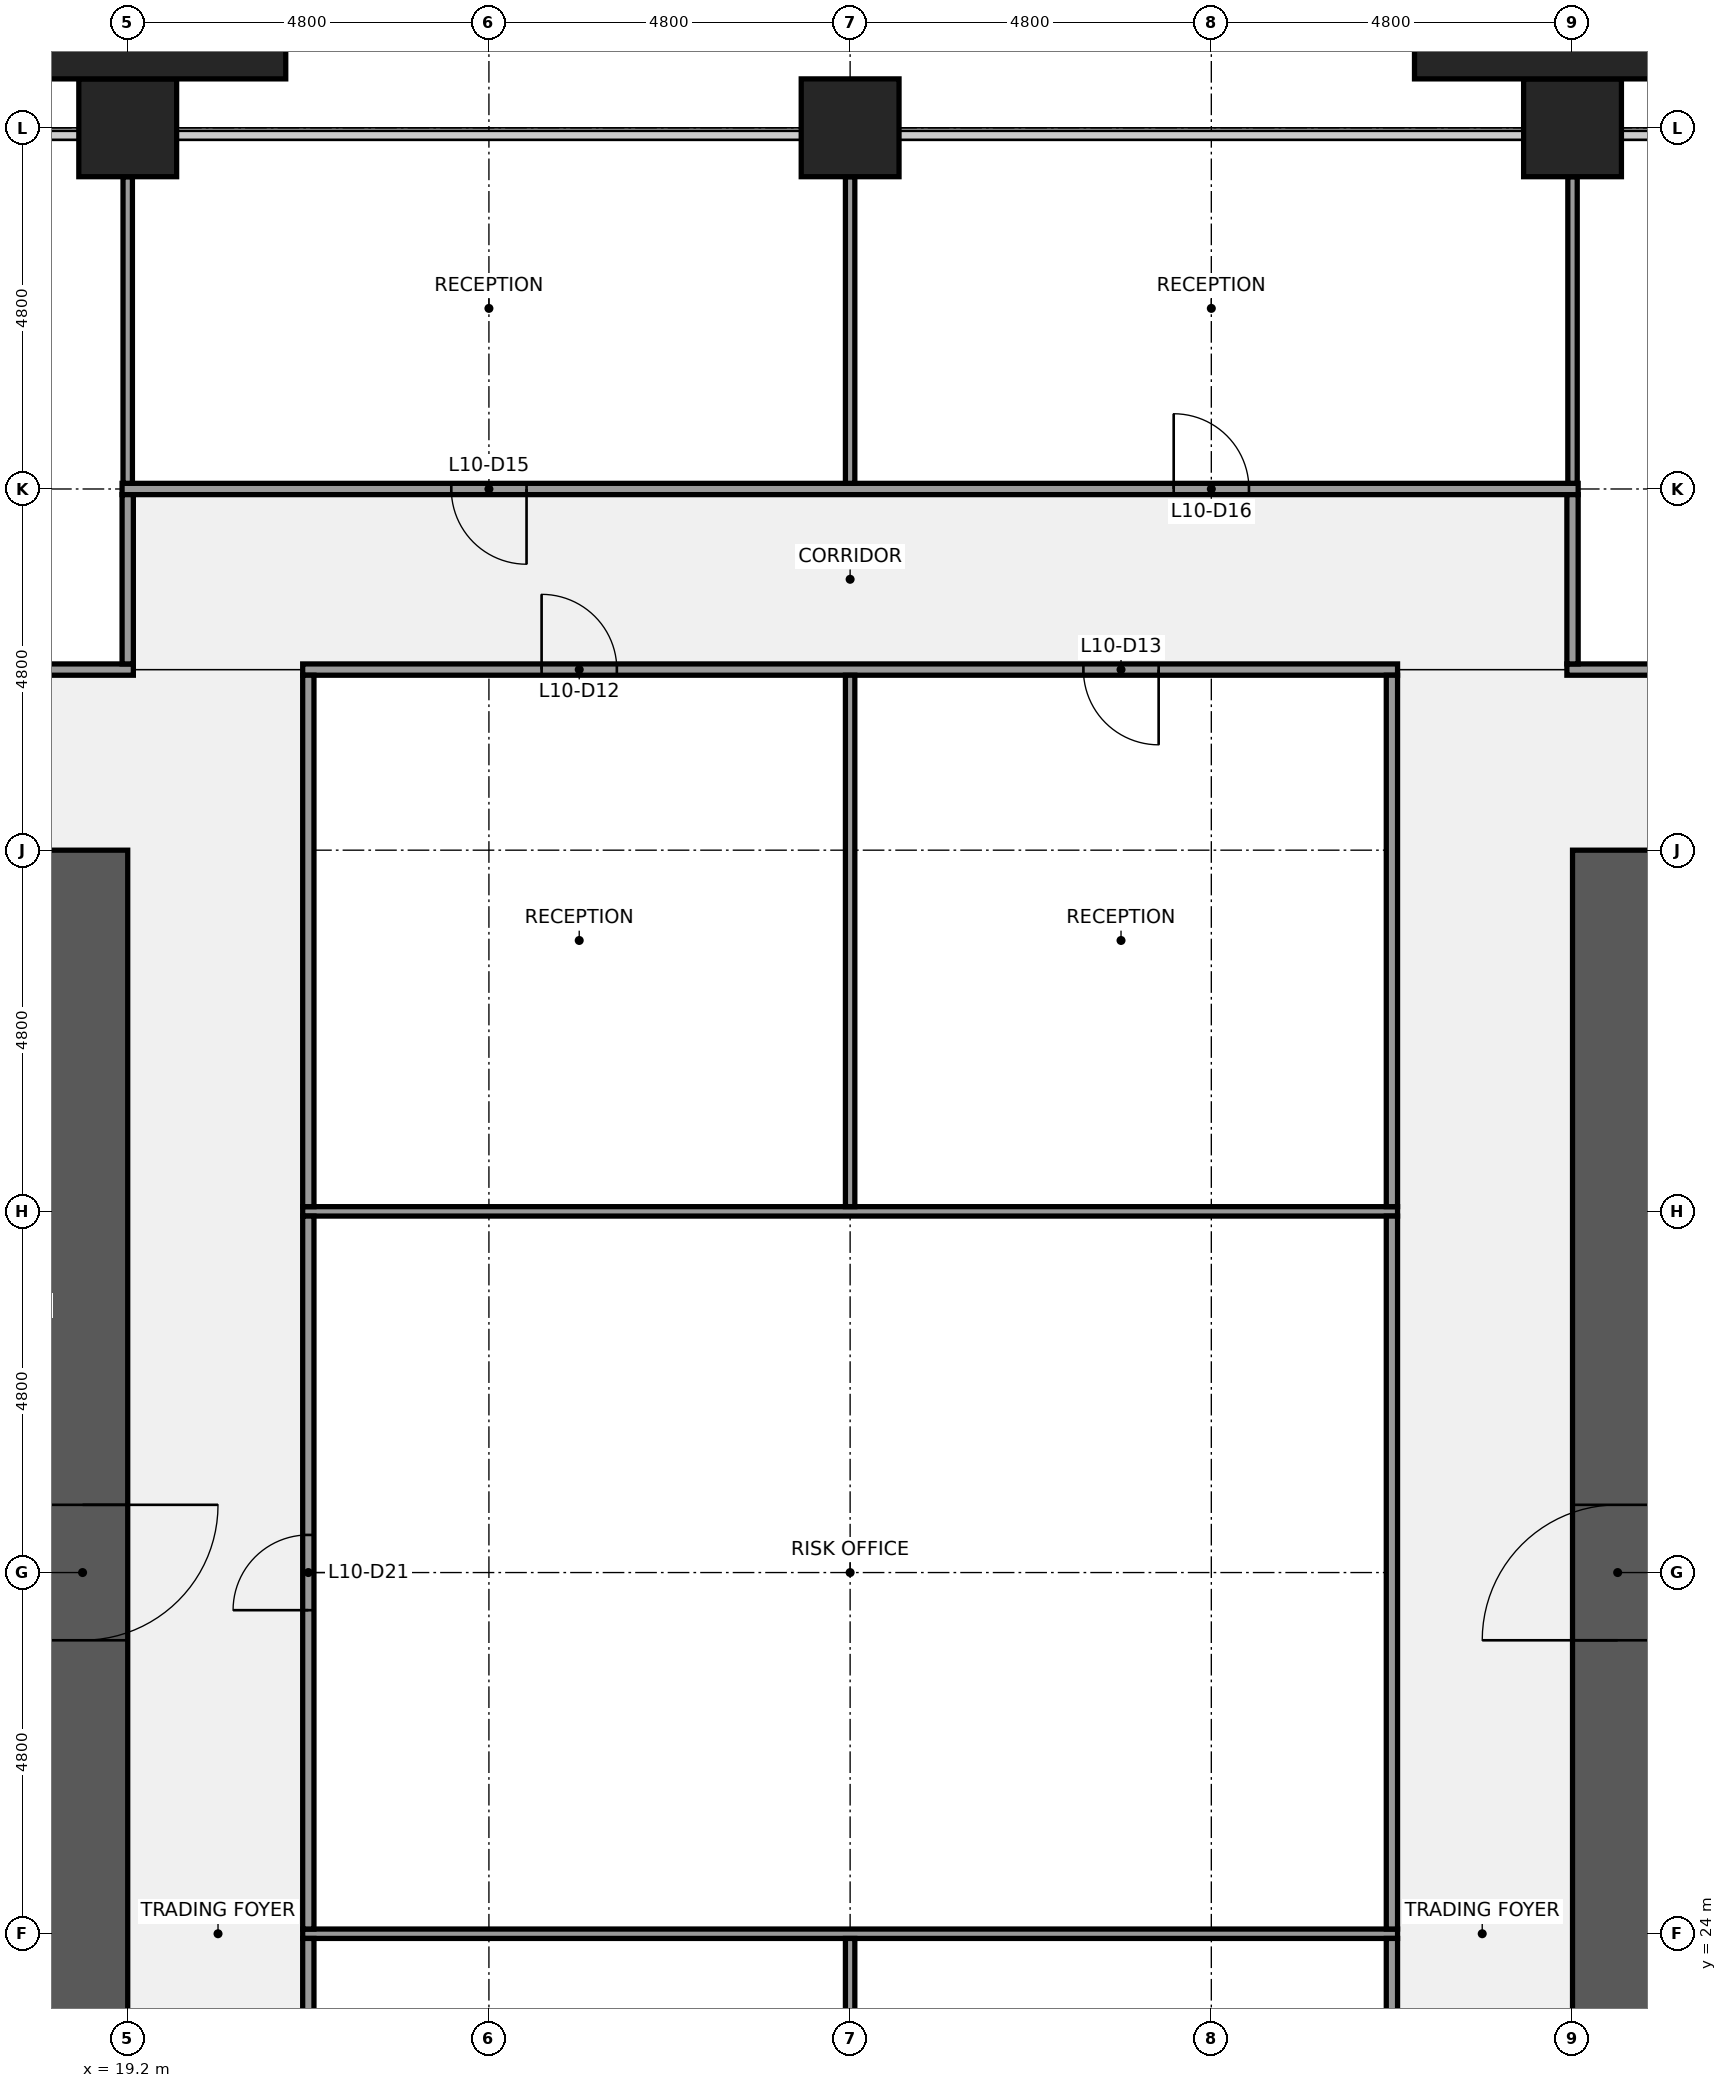
"""IFC4 building model, lengths in metres.
Left out: names, types, materials, properties, quantities, classifications, styles, units other than length and angle.
Written with IfcOpenShell. Run it as: python <this file> out.ifc"""

import sys

from ifc_helpers import new_model, si_unit, direction, frame, frame_2d, origin, origin_2d, place, context, subcontext, project, spatial, rectangle, extrude, element, fill, save


model = new_model("IFC4")
c1 = context("Model", 3, precision=1e-05, world=origin(), true_north=direction((0.0, 1.0)))
c2 = subcontext(c1, "Body", "Model", "MODEL_VIEW")
j1 = project(units=[si_unit("LENGTHUNIT", "METRE"), si_unit("PLANEANGLEUNIT", "RADIAN")], contexts=[c1])
p1 = place(None, origin())
s1 = spatial("IfcSite", under=j1, at=p1, CompositionType="ELEMENT")
p2 = place(p1, origin())
s2 = spatial("IfcBuilding", under=s1, at=p2, CompositionType="ELEMENT")
p3 = place(p2, frame((0.0, 0.0, 51.0)))
s3 = spatial("IfcBuildingStorey", under=s2, at=p3, CompositionType="ELEMENT", Elevation=51.0)
for number, where, z_axis, x_axis in (
    (1, (19.2, 48.0, 0.0), (0.0, 0.0, 1.0), (1.0, 0.0, 0.0)),
    (2, (28.8, 48.0, 0.0), (0.0, 0.0, 1.0), (1.0, 0.0, 0.0)),
    (3, (38.4, 48.0, 0.0), (0.0, 0.0, 1.0), (1.0, 0.0, 0.0)),
):
    element("IfcColumn", number, at=place(p3, frame(where, z_axis=z_axis, x_axis=x_axis)), inside=s3, PredefinedType="COLUMN", context=c2, shape_type="SweptSolid", body=[
        extrude(rectangle(XDim=1.3, YDim=1.3, at=origin_2d()), origin(), (0.0, 0.0, 1.0), 4.0),
    ])
p4 = place(p3, frame((18.6, 38.4, 0.0), z_axis=(0.0, 0.0, 1.0), x_axis=(0.0, -1.0, 0.0)))
e4 = element("IfcWall", 4, at=p4, inside=s3, PredefinedType="SHEAR", context=c2, shape_type="SweptSolid", body=[
    extrude(rectangle(XDim=28.8, YDim=1.2, at=frame_2d((14.4, 0.0))), origin(), (0.0, 0.0, 1.0), 3.84),
])
p5 = place(p4, frame((18.3, 0.0, 0.0)))
e5 = element("IfcOpeningElement", 5, at=p5, cuts=e4, PredefinedType="OPENING", context=c2, shape_type="SweptSolid", body=[
    extrude(rectangle(XDim=1.8, YDim=2.1, at=frame_2d((0.9, 1.05))), frame((0.0, 0.61, 0.0), z_axis=(0.0, -1.0, 0.0), x_axis=(1.0, 0.0, 0.0)), (0.0, 0.0, 1.0), 1.22),
])
p6 = place(p4, frame((8.7, 0.0, 0.0)))
e6 = element("IfcOpeningElement", 6, at=p6, cuts=e4, PredefinedType="OPENING", context=c2, shape_type="SweptSolid", body=[
    extrude(rectangle(XDim=1.8, YDim=2.1, at=frame_2d((0.9, 1.05))), frame((0.0, 0.61, 0.0), z_axis=(0.0, -1.0, 0.0), x_axis=(1.0, 0.0, 0.0)), (0.0, 0.0, 1.0), 1.22),
])
p7 = place(p3, frame((39.0, 9.6, 0.0), z_axis=(0.0, 0.0, 1.0), x_axis=(0.0, 1.0, 0.0)))
e7 = element("IfcWall", 7, at=p7, inside=s3, PredefinedType="SHEAR", context=c2, shape_type="SweptSolid", body=[
    extrude(rectangle(XDim=28.8, YDim=1.2, at=frame_2d((14.4, 0.0))), origin(), (0.0, 0.0, 1.0), 3.84),
])
p8 = place(p7, frame((8.7, 0.0, 0.0)))
e8 = element("IfcOpeningElement", 8, at=p8, cuts=e7, PredefinedType="OPENING", context=c2, shape_type="SweptSolid", body=[
    extrude(rectangle(XDim=1.8, YDim=2.1, at=frame_2d((0.9, 1.05))), frame((0.0, 0.61, 0.0), z_axis=(0.0, -1.0, 0.0), x_axis=(1.0, 0.0, 0.0)), (0.0, 0.0, 1.0), 1.22),
])
p9 = place(p7, frame((18.3, 0.0, 0.0)))
e9 = element("IfcOpeningElement", 9, at=p9, cuts=e7, PredefinedType="OPENING", context=c2, shape_type="SweptSolid", body=[
    extrude(rectangle(XDim=1.8, YDim=2.1, at=frame_2d((0.9, 1.05))), frame((0.0, 0.61, 0.0), z_axis=(0.0, -1.0, 0.0), x_axis=(1.0, 0.0, 0.0)), (0.0, 0.0, 1.0), 1.22),
])
for number, where, z_axis, x_axis in (
    (10, (21.525, 24.0, 0.0), (0.0, 0.0, 1.0), (1.0, 0.0, 0.0)),
    (11, (21.525, 33.6, 0.0), (0.0, 0.0, 1.0), (1.0, 0.0, 0.0)),
):
    element("IfcWall", number, at=place(p3, frame(where, z_axis=z_axis, x_axis=x_axis)), inside=s3, PredefinedType="PARTITIONING", context=c2, shape_type="SweptSolid", body=[
        extrude(rectangle(XDim=14.55, YDim=0.125, at=frame_2d((7.275, 0.0))), origin(), (0.0, 0.0, 1.0), 2.87),
    ])
p10 = place(p3, frame((9.525, 40.8, 0.0), z_axis=(0.0, 0.0, 1.0), x_axis=(1.0, 0.0, 0.0)))
e12 = element("IfcWall", 12, at=p10, inside=s3, PredefinedType="PARTITIONING", context=c2, shape_type="SweptSolid", body=[
    extrude(rectangle(XDim=9.75, YDim=0.15, at=frame_2d((4.875, 0.0))), origin(), (0.0, 0.0, 1.0), 2.87),
])
p11 = place(p10, frame((4.375, 0.0, 0.0)))
e13 = element("IfcOpeningElement", 13, at=p11, cuts=e12, PredefinedType="OPENING", context=c2, shape_type="SweptSolid", body=[
    extrude(rectangle(XDim=1.0, YDim=2.1, at=frame_2d((0.5, 1.05))), frame((0.0, 0.085, 0.0), z_axis=(0.0, -1.0, 0.0), x_axis=(1.0, 0.0, 0.0)), (0.0, 0.0, 1.0), 0.17),
])
p12 = place(p3, frame((21.525, 40.8, 0.0), z_axis=(0.0, 0.0, 1.0), x_axis=(1.0, 0.0, 0.0)))
e14 = element("IfcWall", 14, at=p12, inside=s3, PredefinedType="PARTITIONING", context=c2, shape_type="SweptSolid", body=[
    extrude(rectangle(XDim=14.55, YDim=0.15, at=frame_2d((7.275, 0.0))), origin(), (0.0, 0.0, 1.0), 2.87),
])
p13 = place(p12, frame((3.175, 0.0, 0.0)))
e15 = element("IfcOpeningElement", 15, at=p13, cuts=e14, PredefinedType="OPENING", context=c2, shape_type="SweptSolid", body=[
    extrude(rectangle(XDim=1.0, YDim=2.1, at=frame_2d((0.5, 1.05))), frame((0.0, 0.085, 0.0), z_axis=(0.0, -1.0, 0.0), x_axis=(1.0, 0.0, 0.0)), (0.0, 0.0, 1.0), 0.17),
])
p14 = place(p12, frame((10.375, 0.0, 0.0)))
e16 = element("IfcOpeningElement", 16, at=p14, cuts=e14, PredefinedType="OPENING", context=c2, shape_type="SweptSolid", body=[
    extrude(rectangle(XDim=1.0, YDim=2.1, at=frame_2d((0.5, 1.05))), frame((0.0, 0.085, 0.0), z_axis=(0.0, -1.0, 0.0), x_axis=(1.0, 0.0, 0.0)), (0.0, 0.0, 1.0), 0.17),
])
p15 = place(p3, frame((38.325, 40.8, 0.0), z_axis=(0.0, 0.0, 1.0), x_axis=(1.0, 0.0, 0.0)))
e17 = element("IfcWall", 17, at=p15, inside=s3, PredefinedType="PARTITIONING", context=c2, shape_type="SweptSolid", body=[
    extrude(rectangle(XDim=9.75, YDim=0.15, at=frame_2d((4.875, 0.0))), origin(), (0.0, 0.0, 1.0), 2.87),
])
p16 = place(p15, frame((4.375, 0.0, 0.0)))
e18 = element("IfcOpeningElement", 18, at=p16, cuts=e17, PredefinedType="OPENING", context=c2, shape_type="SweptSolid", body=[
    extrude(rectangle(XDim=1.0, YDim=2.1, at=frame_2d((0.5, 1.05))), frame((0.0, 0.085, 0.0), z_axis=(0.0, -1.0, 0.0), x_axis=(1.0, 0.0, 0.0)), (0.0, 0.0, 1.0), 0.17),
])
p17 = place(p3, frame((19.125, 43.2, 0.0), z_axis=(0.0, 0.0, 1.0), x_axis=(1.0, 0.0, 0.0)))
e19 = element("IfcWall", 19, at=p17, inside=s3, PredefinedType="PARTITIONING", context=c2, shape_type="SweptSolid", body=[
    extrude(rectangle(XDim=19.35, YDim=0.15, at=frame_2d((9.675, 0.0))), origin(), (0.0, 0.0, 1.0), 2.87),
])
p18 = place(p17, frame((4.375, 0.0, 0.0)))
e20 = element("IfcOpeningElement", 20, at=p18, cuts=e19, PredefinedType="OPENING", context=c2, shape_type="SweptSolid", body=[
    extrude(rectangle(XDim=1.0, YDim=2.1, at=frame_2d((0.5, 1.05))), frame((0.0, 0.085, 0.0), z_axis=(0.0, -1.0, 0.0), x_axis=(1.0, 0.0, 0.0)), (0.0, 0.0, 1.0), 0.17),
])
p19 = place(p17, frame((13.975, 0.0, 0.0)))
e21 = element("IfcOpeningElement", 21, at=p19, cuts=e19, PredefinedType="OPENING", context=c2, shape_type="SweptSolid", body=[
    extrude(rectangle(XDim=1.0, YDim=2.1, at=frame_2d((0.5, 1.05))), frame((0.0, 0.085, 0.0), z_axis=(0.0, -1.0, 0.0), x_axis=(1.0, 0.0, 0.0)), (0.0, 0.0, 1.0), 0.17),
])
p20 = place(p3, frame((19.2, 43.275, 0.0), z_axis=(0.0, 0.0, 1.0), x_axis=(0.0, 1.0, 0.0)))
e22 = element("IfcWall", 22, at=p20, inside=s3, PredefinedType="PARTITIONING", context=c2, shape_type="SweptSolid", body=[
    extrude(rectangle(XDim=4.075, YDim=0.125, at=frame_2d((2.038, 0.0))), origin(), (0.0, 0.0, 1.0), 2.87),
])
p21 = place(p3, frame((19.2, 40.875, 0.0), z_axis=(0.0, 0.0, 1.0), x_axis=(0.0, 1.0, 0.0)))
e23 = element("IfcWall", 23, at=p21, inside=s3, PredefinedType="PARTITIONING", context=c2, shape_type="SweptSolid", body=[
    extrude(rectangle(XDim=2.25, YDim=0.15, at=frame_2d((1.125, 0.0))), origin(), (0.0, 0.0, 1.0), 2.87),
])
p22 = place(p3, frame((21.6, 20.462, 0.0), z_axis=(0.0, 0.0, 1.0), x_axis=(0.0, 1.0, 0.0)))
e24 = element("IfcWall", 24, at=p22, inside=s3, PredefinedType="PARTITIONING", context=c2, shape_type="SweptSolid", body=[
    extrude(rectangle(XDim=3.475, YDim=0.15, at=frame_2d((1.738, 0.0))), origin(), (0.0, 0.0, 1.0), 2.87),
])
p23 = place(p22, frame((1.238, 0.0, 0.0)))
e25 = element("IfcOpeningElement", 25, at=p23, cuts=e24, PredefinedType="OPENING", context=c2, shape_type="SweptSolid", body=[
    extrude(rectangle(XDim=1.0, YDim=2.1, at=frame_2d((0.5, 1.05))), frame((0.0, 0.085, 0.0), z_axis=(0.0, -1.0, 0.0), x_axis=(1.0, 0.0, 0.0)), (0.0, 0.0, 1.0), 0.17),
])
p24 = place(p3, frame((21.6, 24.062, 0.0), z_axis=(0.0, 0.0, 1.0), x_axis=(0.0, 1.0, 0.0)))
e26 = element("IfcWall", 26, at=p24, inside=s3, PredefinedType="PARTITIONING", context=c2, shape_type="SweptSolid", body=[
    extrude(rectangle(XDim=9.475, YDim=0.15, at=frame_2d((4.738, 0.0))), origin(), (0.0, 0.0, 1.0), 2.87),
])
p25 = place(p24, frame((4.238, 0.0, 0.0)))
e27 = element("IfcOpeningElement", 27, at=p25, cuts=e26, PredefinedType="OPENING", context=c2, shape_type="SweptSolid", body=[
    extrude(rectangle(XDim=1.0, YDim=2.1, at=frame_2d((0.5, 1.05))), frame((0.0, 0.085, 0.0), z_axis=(0.0, -1.0, 0.0), x_axis=(1.0, 0.0, 0.0)), (0.0, 0.0, 1.0), 0.17),
])
p26 = place(p3, frame((21.6, 33.663, 0.0), z_axis=(0.0, 0.0, 1.0), x_axis=(0.0, 1.0, 0.0)))
e28 = element("IfcWall", 28, at=p26, inside=s3, PredefinedType="PARTITIONING", context=c2, shape_type="SweptSolid", body=[
    extrude(rectangle(XDim=7.062, YDim=0.15, at=frame_2d((3.531, 0.0))), origin(), (0.0, 0.0, 1.0), 2.87),
])
p27 = place(p3, frame((28.8, 20.462, 0.0), z_axis=(0.0, 0.0, 1.0), x_axis=(0.0, 1.0, 0.0)))
e29 = element("IfcWall", 29, at=p27, inside=s3, PredefinedType="PARTITIONING", context=c2, shape_type="SweptSolid", body=[
    extrude(rectangle(XDim=3.475, YDim=0.125, at=frame_2d((1.738, 0.0))), origin(), (0.0, 0.0, 1.0), 2.87),
])
p28 = place(p3, frame((28.8, 33.663, 0.0), z_axis=(0.0, 0.0, 1.0), x_axis=(0.0, 1.0, 0.0)))
e30 = element("IfcWall", 30, at=p28, inside=s3, PredefinedType="PARTITIONING", context=c2, shape_type="SweptSolid", body=[
    extrude(rectangle(XDim=7.062, YDim=0.125, at=frame_2d((3.531, 0.0))), origin(), (0.0, 0.0, 1.0), 2.87),
])
p29 = place(p3, frame((28.8, 43.275, 0.0), z_axis=(0.0, 0.0, 1.0), x_axis=(0.0, 1.0, 0.0)))
e31 = element("IfcWall", 31, at=p29, inside=s3, PredefinedType="PARTITIONING", context=c2, shape_type="SweptSolid", body=[
    extrude(rectangle(XDim=4.075, YDim=0.125, at=frame_2d((2.038, 0.0))), origin(), (0.0, 0.0, 1.0), 2.87),
])
p30 = place(p3, frame((36.0, 20.462, 0.0), z_axis=(0.0, 0.0, 1.0), x_axis=(0.0, 1.0, 0.0)))
e32 = element("IfcWall", 32, at=p30, inside=s3, PredefinedType="PARTITIONING", context=c2, shape_type="SweptSolid", body=[
    extrude(rectangle(XDim=3.475, YDim=0.15, at=frame_2d((1.738, 0.0))), origin(), (0.0, 0.0, 1.0), 2.87),
])
p31 = place(p30, frame((1.238, 0.0, 0.0)))
e33 = element("IfcOpeningElement", 33, at=p31, cuts=e32, PredefinedType="OPENING", context=c2, shape_type="SweptSolid", body=[
    extrude(rectangle(XDim=1.0, YDim=2.1, at=frame_2d((0.5, 1.05))), frame((0.0, 0.085, 0.0), z_axis=(0.0, -1.0, 0.0), x_axis=(1.0, 0.0, 0.0)), (0.0, 0.0, 1.0), 0.17),
])
p32 = place(p3, frame((36.0, 24.062, 0.0), z_axis=(0.0, 0.0, 1.0), x_axis=(0.0, 1.0, 0.0)))
e34 = element("IfcWall", 34, at=p32, inside=s3, PredefinedType="PARTITIONING", context=c2, shape_type="SweptSolid", body=[
    extrude(rectangle(XDim=9.475, YDim=0.15, at=frame_2d((4.738, 0.0))), origin(), (0.0, 0.0, 1.0), 2.87),
])
p33 = place(p3, frame((36.0, 33.663, 0.0), z_axis=(0.0, 0.0, 1.0), x_axis=(0.0, 1.0, 0.0)))
e35 = element("IfcWall", 35, at=p33, inside=s3, PredefinedType="PARTITIONING", context=c2, shape_type="SweptSolid", body=[
    extrude(rectangle(XDim=7.062, YDim=0.15, at=frame_2d((3.531, 0.0))), origin(), (0.0, 0.0, 1.0), 2.87),
])
p34 = place(p3, frame((38.4, 43.275, 0.0), z_axis=(0.0, 0.0, 1.0), x_axis=(0.0, 1.0, 0.0)))
e36 = element("IfcWall", 36, at=p34, inside=s3, PredefinedType="PARTITIONING", context=c2, shape_type="SweptSolid", body=[
    extrude(rectangle(XDim=4.075, YDim=0.125, at=frame_2d((2.038, 0.0))), origin(), (0.0, 0.0, 1.0), 2.87),
])
p35 = place(p3, frame((38.4, 40.875, 0.0), z_axis=(0.0, 0.0, 1.0), x_axis=(0.0, 1.0, 0.0)))
e37 = element("IfcWall", 37, at=p35, inside=s3, PredefinedType="PARTITIONING", context=c2, shape_type="SweptSolid", body=[
    extrude(rectangle(XDim=2.25, YDim=0.15, at=frame_2d((1.125, 0.0))), origin(), (0.0, 0.0, 1.0), 2.87),
])
for number, where, z_axis, x_axis in (
    (38, (19.2, 49.075, 0.0), (0.0, 0.0, 1.0), (1.0, 0.0, 0.0)),
    (39, (38.4, 49.075, 0.0), (0.0, 0.0, 1.0), (1.0, 0.0, 0.0)),
):
    element("IfcColumn", number, at=place(p3, frame(where, z_axis=z_axis, x_axis=x_axis)), inside=s3, PredefinedType="PILASTER", context=c2, shape_type="SweptSolid", body=[
        extrude(rectangle(XDim=4.2, YDim=0.85, at=origin_2d()), origin(), (0.0, 0.0, 1.0), 4.0),
    ])
p36 = place(p6, origin())
e40 = element("IfcDoor", 40, at=p36, inside=s3, OperationType="DOUBLE_DOOR_SINGLE_SWING", PredefinedType="DOOR", context=c2, shape_type="SweptSolid", body=[
    extrude(rectangle(XDim=1.8, YDim=2.1, at=frame_2d((0.9, 1.05))), frame((0.0, 0.025, 0.0), z_axis=(0.0, -1.0, 0.0), x_axis=(1.0, 0.0, 0.0)), (0.0, 0.0, 1.0), 0.05),
])
fill(e6, e40)
p37 = place(p9, origin())
e41 = element("IfcDoor", 41, at=p37, inside=s3, OperationType="DOUBLE_DOOR_SINGLE_SWING", PredefinedType="DOOR", context=c2, shape_type="SweptSolid", body=[
    extrude(rectangle(XDim=1.8, YDim=2.1, at=frame_2d((0.9, 1.05))), frame((0.0, 0.025, 0.0), z_axis=(0.0, -1.0, 0.0), x_axis=(1.0, 0.0, 0.0)), (0.0, 0.0, 1.0), 0.05),
])
fill(e9, e41)
p38 = place(p13, origin())
e42 = element("IfcDoor", 42, at=p38, inside=s3, OperationType="SINGLE_SWING_LEFT", PredefinedType="DOOR", context=c2, shape_type="SweptSolid", body=[
    extrude(rectangle(XDim=1.0, YDim=2.1, at=frame_2d((0.5, 1.05))), frame((0.0, 0.025, 0.0), z_axis=(0.0, -1.0, 0.0), x_axis=(1.0, 0.0, 0.0)), (0.0, 0.0, 1.0), 0.05),
])
fill(e15, e42)
p39 = place(p14, origin())
e43 = element("IfcDoor", 43, at=p39, inside=s3, OperationType="SINGLE_SWING_RIGHT", PredefinedType="DOOR", context=c2, shape_type="SweptSolid", body=[
    extrude(rectangle(XDim=1.0, YDim=2.1, at=frame_2d((0.5, 1.05))), frame((0.0, 0.025, 0.0), z_axis=(0.0, -1.0, 0.0), x_axis=(1.0, 0.0, 0.0)), (0.0, 0.0, 1.0), 0.05),
])
fill(e16, e43)
p40 = place(p18, origin())
e44 = element("IfcDoor", 44, at=p40, inside=s3, OperationType="SINGLE_SWING_RIGHT", PredefinedType="DOOR", context=c2, shape_type="SweptSolid", body=[
    extrude(rectangle(XDim=1.0, YDim=2.1, at=frame_2d((0.5, 1.05))), frame((0.0, 0.025, 0.0), z_axis=(0.0, -1.0, 0.0), x_axis=(1.0, 0.0, 0.0)), (0.0, 0.0, 1.0), 0.05),
])
fill(e20, e44)
p41 = place(p19, origin())
e45 = element("IfcDoor", 45, at=p41, inside=s3, OperationType="SINGLE_SWING_LEFT", PredefinedType="DOOR", context=c2, shape_type="SweptSolid", body=[
    extrude(rectangle(XDim=1.0, YDim=2.1, at=frame_2d((0.5, 1.05))), frame((0.0, 0.025, 0.0), z_axis=(0.0, -1.0, 0.0), x_axis=(1.0, 0.0, 0.0)), (0.0, 0.0, 1.0), 0.05),
])
fill(e21, e45)
p42 = place(p25, origin())
e46 = element("IfcDoor", 46, at=p42, inside=s3, OperationType="SINGLE_SWING_LEFT", PredefinedType="DOOR", context=c2, shape_type="SweptSolid", body=[
    extrude(rectangle(XDim=1.0, YDim=2.1, at=frame_2d((0.5, 1.05))), frame((0.0, 0.025, 0.0), z_axis=(0.0, -1.0, 0.0), x_axis=(1.0, 0.0, 0.0)), (0.0, 0.0, 1.0), 0.05),
])
fill(e27, e46)
save(model, sys.argv[1])
